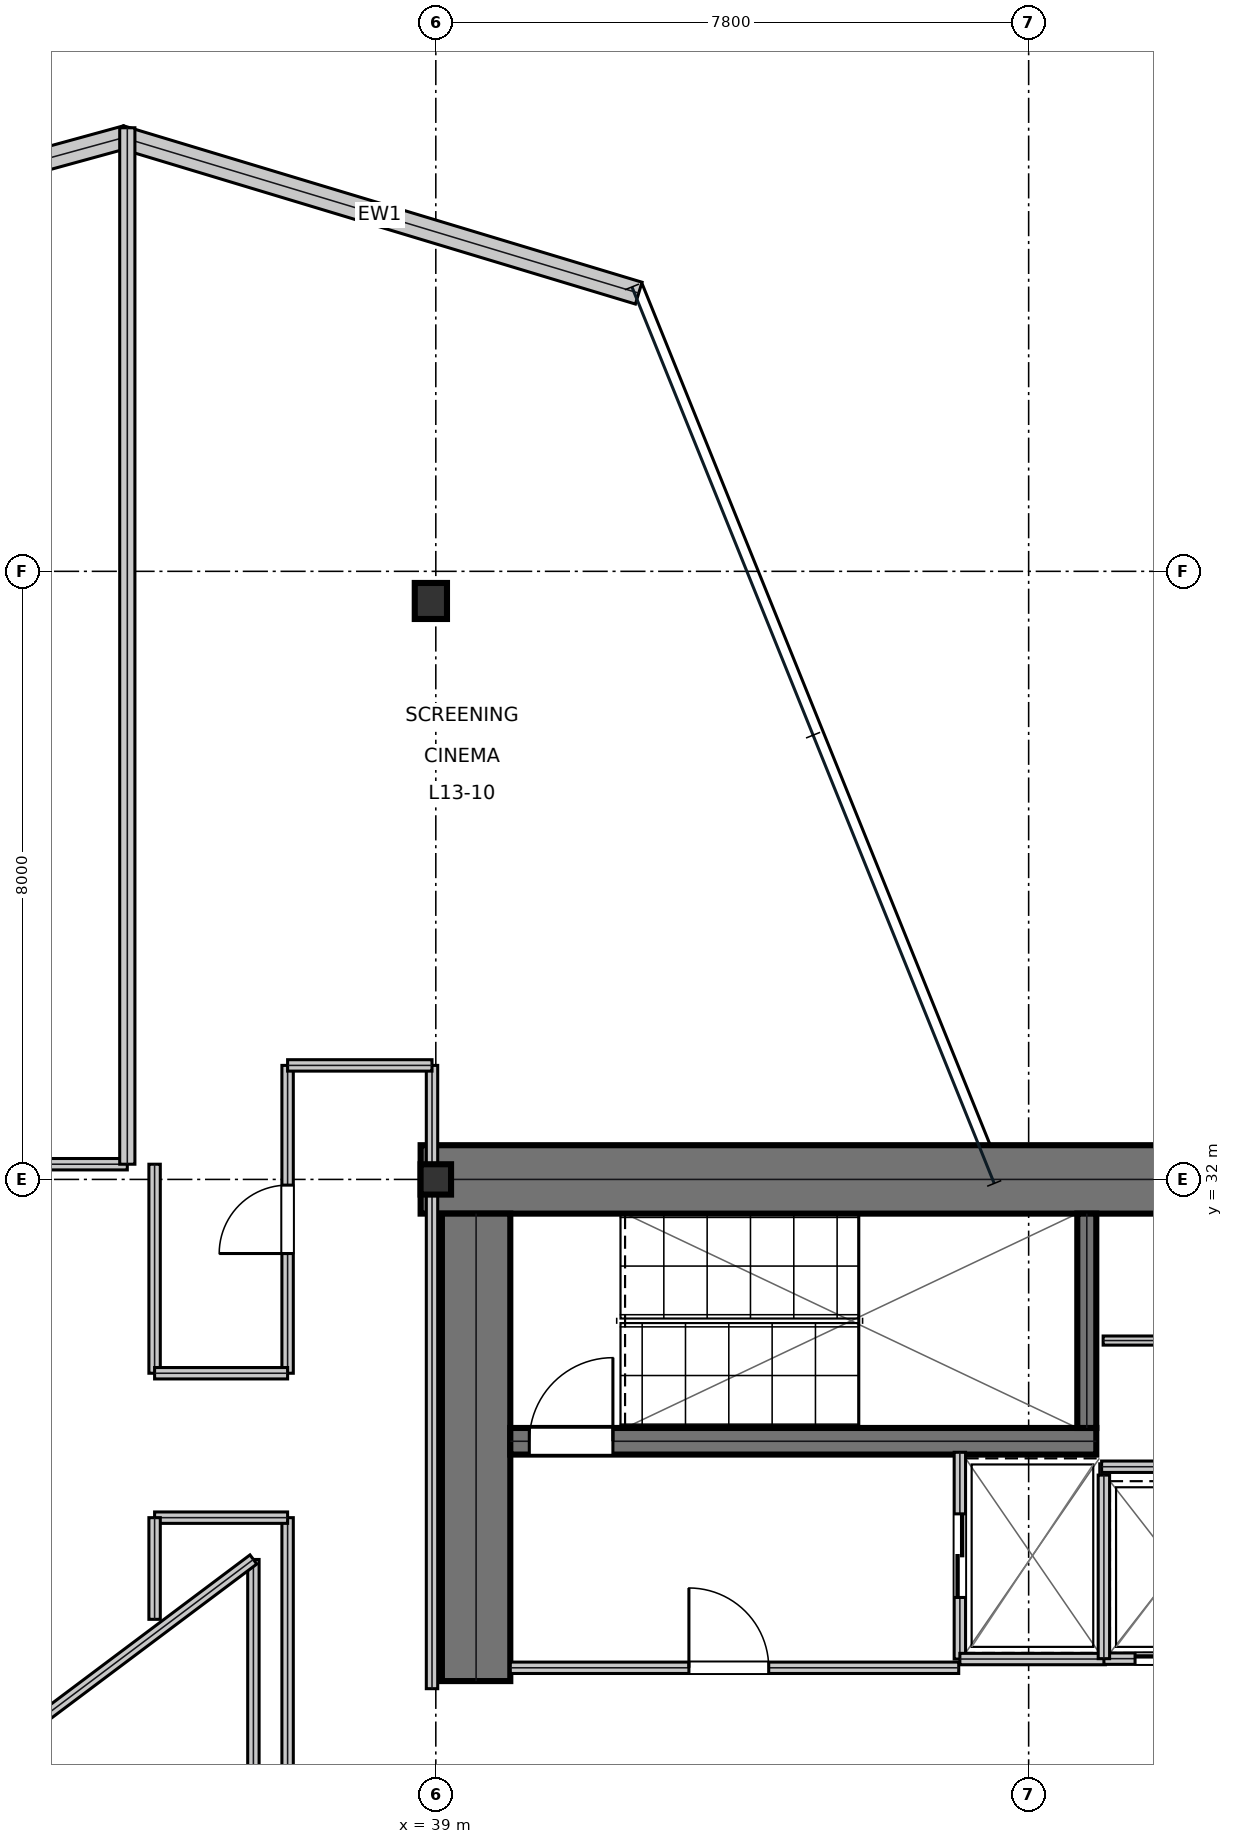
"""IFC4 building model, lengths in metres.
Left out: names, types, materials, properties, quantities, classifications, styles, units other than length and angle.
Written with IfcOpenShell. Run it as: python <this file> out.ifc"""

import sys

from ifc_helpers import new_model, si_unit, direction, frame, frame_2d, origin, origin_2d, place, context, subcontext, project, spatial, rectangle, i_section, extrude, element, fill, save


model = new_model("IFC4")
c1 = context("Model", 3, precision=1e-05, world=origin(), true_north=direction((0.0, 1.0)))
c2 = subcontext(c1, "Body", "Model", "MODEL_VIEW")
j1 = project(units=[si_unit("LENGTHUNIT", "METRE"), si_unit("PLANEANGLEUNIT", "RADIAN")], contexts=[c1])
p1 = place(None, origin())
s1 = spatial("IfcSite", under=j1, at=p1, CompositionType="ELEMENT")
p2 = place(p1, origin())
s2 = spatial("IfcBuilding", under=s1, at=p2, CompositionType="ELEMENT")
p3 = place(p2, frame((0.0, 0.0, 62.1)))
s3 = spatial("IfcBuildingStorey", under=s2, at=p3, CompositionType="ELEMENT", Elevation=62.1)
p4 = place(p3, frame((38.8, 32.0, 0.0), z_axis=(0.0, 0.0, 1.0), x_axis=(1.0, 0.0, 0.0)))
e1 = element("IfcWall", 1, at=p4, inside=s3, PredefinedType="SHEAR", context=c2, shape_type="SweptSolid", body=[
    extrude(rectangle(XDim=16.0, YDim=0.9, at=frame_2d((8.0, 0.0))), origin(), (0.0, 0.0, 1.0), 3.81),
])
p5 = place(p3, frame((39.53, 25.4, 0.0), z_axis=(0.0, 0.0, 1.0), x_axis=(0.0, 1.0, 0.0)))
e2 = element("IfcWall", 2, at=p5, inside=s3, PredefinedType="SHEAR", context=c2, shape_type="SweptSolid", body=[
    extrude(rectangle(XDim=6.15, YDim=0.9, at=frame_2d((3.075, 0.0))), origin(), (0.0, 0.0, 1.0), 3.81),
])
p6 = place(p3, frame((39.98, 28.555, 0.0), z_axis=(0.0, 0.0, 1.0), x_axis=(1.0, 0.0, 0.0)))
e3 = element("IfcWall", 3, at=p6, inside=s3, PredefinedType="SHEAR", context=c2, shape_type="SweptSolid", body=[
    extrude(rectangle(XDim=7.71, YDim=0.35, at=frame_2d((3.855, 0.0))), origin(), (0.0, 0.0, 1.0), 3.81),
])
p7 = place(p6, frame((0.25, 0.0, 0.0)))
e4 = element("IfcOpeningElement", 4, at=p7, cuts=e3, PredefinedType="OPENING", context=c2, shape_type="SweptSolid", body=[
    extrude(rectangle(XDim=1.1, YDim=2.15, at=frame_2d((0.55, 1.075))), frame((0.0, 0.185, 0.0), z_axis=(0.0, -1.0, 0.0), x_axis=(1.0, 0.0, 0.0)), (0.0, 0.0, 1.0), 0.37),
])
p8 = place(p3, frame((47.565, 28.73, 0.0), z_axis=(0.0, 0.0, 1.0), x_axis=(0.0, 1.0, 0.0)))
e5 = element("IfcWall", 5, at=p8, inside=s3, PredefinedType="SHEAR", context=c2, shape_type="SweptSolid", body=[
    extrude(rectangle(XDim=2.82, YDim=0.25, at=frame_2d((1.41, 0.0))), origin(), (0.0, 0.0, 1.0), 3.81),
])
p9 = place(p3, frame((39.0, 32.0, 0.0), z_axis=(0.0, 0.0, 1.0), x_axis=(1.0, 0.0, 0.0)))
e6 = element("IfcColumn", 6, at=p9, inside=s3, PredefinedType="COLUMN", context=c2, shape_type="SweptSolid", body=[
    extrude(i_section(OverallWidth=0.401, OverallDepth=0.399, WebThickness=0.025, FlangeThickness=0.04, at=origin_2d()), origin(), (0.0, 0.0, 1.0), 4.044),
])
p10 = place(p3, frame((38.935, 39.61, 0.016), z_axis=(0.0, 0.0, 1.0), x_axis=(1.0, 0.0, 0.0)))
e7 = element("IfcColumn", 7, at=p10, inside=s3, PredefinedType="COLUMN", context=c2, shape_type="SweptSolid", body=[
    extrude(i_section(OverallWidth=0.424, OverallDepth=0.474, WebThickness=0.048, FlangeThickness=0.077, at=origin_2d()), origin(), (0.0, 0.0, 1.0), 4.018),
])
p11 = place(p3, frame((41.67, 43.66, 0.0), z_axis=(0.0, 0.0, 1.0), x_axis=(-0.957387451844, 0.288806625707, 0.0)))
e8 = element("IfcWall", 8, at=p11, inside=s3, PredefinedType="STANDARD", context=c2, shape_type="SweptSolid", body=[
    extrude(rectangle(XDim=7.123, YDim=0.3, at=frame_2d((3.562, 0.0))), origin(), (0.0, 0.0, 1.0), 3.81),
])
p12 = place(p3, frame((34.928, 45.716, 0.0), z_axis=(0.0, 0.0, 1.0), x_axis=(-0.96439075506, -0.264481514581, 0.0)))
e9 = element("IfcWall", 9, at=p12, inside=s3, PredefinedType="STANDARD", context=c2, shape_type="SweptSolid", body=[
    extrude(rectangle(XDim=7.071, YDim=0.3, at=frame_2d((3.535, 0.0))), origin(), (0.0, 0.0, 1.0), 3.81),
])
p13 = place(p3, frame((39.98, 25.575, 0.0), z_axis=(0.0, 0.0, 1.0), x_axis=(1.0, 0.0, 0.0)))
e10 = element("IfcWall", 10, at=p13, inside=s3, PredefinedType="PARTITIONING", context=c2, shape_type="SweptSolid", body=[
    extrude(rectangle(XDim=5.9, YDim=0.15, at=frame_2d((2.95, 0.0))), origin(), (0.0, 0.0, 1.0), 3.81),
])
p14 = place(p13, frame((2.35, 0.0, 0.0)))
e11 = element("IfcOpeningElement", 11, at=p14, cuts=e10, PredefinedType="OPENING", context=c2, shape_type="SweptSolid", body=[
    extrude(rectangle(XDim=1.05, YDim=2.15, at=frame_2d((0.525, 1.075))), frame((0.0, 0.085, 0.0), z_axis=(0.0, -1.0, 0.0), x_axis=(1.0, 0.0, 0.0)), (0.0, 0.0, 1.0), 0.17),
])
p15 = place(p3, frame((45.895, 25.69, 0.0), z_axis=(0.0, 0.0, 1.0), x_axis=(0.0, 1.0, 0.0)))
e12 = element("IfcWall", 12, at=p15, inside=s3, PredefinedType="PARTITIONING", context=c2, shape_type="SweptSolid", body=[
    extrude(rectangle(XDim=2.72, YDim=0.15, at=frame_2d((1.36, 0.0))), origin(), (0.0, 0.0, 1.0), 3.81),
])
p16 = place(p15, frame((0.81, 0.0, 0.0)))
e13 = element("IfcOpeningElement", 13, at=p16, cuts=e12, PredefinedType="OPENING", context=c2, shape_type="SweptSolid", body=[
    extrude(rectangle(XDim=1.1, YDim=2.15, at=frame_2d((0.55, 1.075))), frame((0.0, 0.085, 0.0), z_axis=(0.0, -1.0, 0.0), x_axis=(1.0, 0.0, 0.0)), (0.0, 0.0, 1.0), 0.17),
])
p17 = place(p3, frame((45.895, 25.69, 0.0), z_axis=(0.0, 0.0, 1.0), x_axis=(1.0, 0.0, 0.0)))
e14 = element("IfcWall", 14, at=p17, inside=s3, PredefinedType="PARTITIONING", context=c2, shape_type="SweptSolid", body=[
    extrude(rectangle(XDim=1.915, YDim=0.15, at=frame_2d((0.958, 0.0))), origin(), (0.0, 0.0, 1.0), 3.81),
])
p18 = place(p3, frame((47.79, 25.695, 0.0), z_axis=(0.0, 0.0, 1.0), x_axis=(1.0, 0.0, 0.0)))
e15 = element("IfcWall", 15, at=p18, inside=s3, PredefinedType="PARTITIONING", context=c2, shape_type="SweptSolid", body=[
    extrude(rectangle(XDim=1.92, YDim=0.15, at=frame_2d((0.96, 0.0))), origin(), (0.0, 0.0, 1.0), 3.81),
])
p19 = place(p18, frame((0.41, 0.0, 0.0)))
e16 = element("IfcOpeningElement", 16, at=p19, cuts=e15, PredefinedType="OPENING", context=c2, shape_type="SweptSolid", body=[
    extrude(rectangle(XDim=1.1, YDim=2.15, at=frame_2d((0.55, 1.075))), frame((0.0, 0.085, 0.0), z_axis=(0.0, -1.0, 0.0), x_axis=(1.0, 0.0, 0.0)), (0.0, 0.0, 1.0), 0.17),
])
p20 = place(p3, frame((47.79, 25.695, 0.0), z_axis=(0.0, 0.0, 1.0), x_axis=(0.0, 1.0, 0.0)))
e17 = element("IfcWall", 17, at=p20, inside=s3, PredefinedType="PARTITIONING", context=c2, shape_type="SweptSolid", body=[
    extrude(rectangle(XDim=2.415, YDim=0.15, at=frame_2d((1.208, 0.0))), origin(), (0.0, 0.0, 1.0), 3.81),
])
p21 = place(p3, frame((47.76, 28.22, 0.0), z_axis=(0.0, 0.0, 1.0), x_axis=(1.0, 0.0, 0.0)))
e18 = element("IfcWall", 18, at=p21, inside=s3, PredefinedType="PARTITIONING", context=c2, shape_type="SweptSolid", body=[
    extrude(rectangle(XDim=1.96, YDim=0.15, at=frame_2d((0.98, 0.0))), origin(), (0.0, 0.0, 1.0), 3.81),
])
p22 = place(p3, frame((47.78, 29.88, 0.0), z_axis=(0.0, 0.0, 1.0), x_axis=(1.0, 0.0, 0.0)))
e19 = element("IfcWall", 19, at=p22, inside=s3, PredefinedType="PARTITIONING", context=c2, shape_type="SweptSolid", body=[
    extrude(rectangle(XDim=1.92, YDim=0.12, at=frame_2d((0.96, 0.0))), origin(), (0.0, 0.0, 1.0), 3.81),
])
p23 = place(p3, frame((37.05, 14.5, 0.0), z_axis=(0.0, 0.0, 1.0), x_axis=(0.0, 1.0, 0.0)))
e20 = element("IfcWall", 20, at=p23, inside=s3, PredefinedType="PARTITIONING", context=c2, shape_type="SweptSolid", body=[
    extrude(rectangle(XDim=13.05, YDim=0.15, at=frame_2d((6.525, 0.0))), origin(), (0.0, 0.0, 1.0), 3.181),
])
p24 = place(p23, frame((4.635, 0.0, 0.0)))
e21 = element("IfcOpeningElement", 21, at=p24, cuts=e20, PredefinedType="OPENING", context=c2, shape_type="SweptSolid", body=[
    extrude(rectangle(XDim=0.9, YDim=2.15, at=frame_2d((0.45, 1.075))), frame((0.0, 0.085, 0.0), z_axis=(0.0, -1.0, 0.0), x_axis=(1.0, 0.0, 0.0)), (0.0, 0.0, 1.0), 0.17),
])
p25 = place(p3, frame((37.05, 29.45, 0.0), z_axis=(0.0, 0.0, 1.0), x_axis=(0.0, 1.0, 0.0)))
e22 = element("IfcWall", 22, at=p25, inside=s3, PredefinedType="PARTITIONING", context=c2, shape_type="SweptSolid", body=[
    extrude(rectangle(XDim=4.05, YDim=0.15, at=frame_2d((2.025, 0.0))), origin(), (0.0, 0.0, 1.0), 3.181),
])
p26 = place(p25, frame((1.575, 0.0, 0.0)))
e23 = element("IfcOpeningElement", 23, at=p26, cuts=e22, PredefinedType="OPENING", context=c2, shape_type="SweptSolid", body=[
    extrude(rectangle(XDim=0.9, YDim=2.15, at=frame_2d((0.45, 1.075))), frame((0.0, 0.085, 0.0), z_axis=(0.0, -1.0, 0.0), x_axis=(1.0, 0.0, 0.0)), (0.0, 0.0, 1.0), 0.17),
])
p27 = place(p3, frame((35.3, 27.55, 0.0), z_axis=(0.0, 0.0, 1.0), x_axis=(1.0, 0.0, 0.0)))
e24 = element("IfcWall", 24, at=p27, inside=s3, PredefinedType="PARTITIONING", context=c2, shape_type="SweptSolid", body=[
    extrude(rectangle(XDim=1.75, YDim=0.15, at=frame_2d((0.875, 0.0))), origin(), (0.0, 0.0, 1.0), 3.391),
])
p28 = place(p3, frame((35.3, 26.212, 0.0), z_axis=(0.0, 0.0, 1.0), x_axis=(0.0, 1.0, 0.0)))
e25 = element("IfcWall", 25, at=p28, inside=s3, PredefinedType="PARTITIONING", context=c2, shape_type="SweptSolid", body=[
    extrude(rectangle(XDim=1.338, YDim=0.15, at=frame_2d((0.669, 0.0))), origin(), (0.0, 0.0, 1.0), 3.81),
])
p29 = place(p3, frame((33.4, 32.2, 0.0), z_axis=(0.0, 0.0, 1.0), x_axis=(1.0, 0.0, 0.0)))
e26 = element("IfcWall", 26, at=p29, inside=s3, PredefinedType="PARTITIONING", context=c2, shape_type="SweptSolid", body=[
    extrude(rectangle(XDim=1.541, YDim=0.15, at=frame_2d((0.771, 0.0))), origin(), (0.0, 0.0, 1.0), 3.181),
])
p30 = place(p3, frame((38.95, 25.3, 0.0), z_axis=(0.0, 0.0, 1.0), x_axis=(0.0, 1.0, 0.0)))
e27 = element("IfcWall", 27, at=p30, inside=s3, PredefinedType="PARTITIONING", context=c2, shape_type="SweptSolid", body=[
    extrude(rectangle(XDim=8.2, YDim=0.15, at=frame_2d((4.1, 0.0))), origin(), (0.0, 0.0, 1.0), 3.181),
])
p31 = place(p3, frame((35.3, 29.45, 0.0), z_axis=(0.0, 0.0, 1.0), x_axis=(0.0, 1.0, 0.0)))
e28 = element("IfcWall", 28, at=p31, inside=s3, PredefinedType="PARTITIONING", context=c2, shape_type="SweptSolid", body=[
    extrude(rectangle(XDim=2.75, YDim=0.15, at=frame_2d((1.375, 0.0))), origin(), (0.0, 0.0, 1.0), 3.181),
])
p32 = place(p3, frame((37.05, 33.5, 0.0), z_axis=(0.0, 0.0, 1.0), x_axis=(1.0, 0.0, 0.0)))
e29 = element("IfcWall", 29, at=p32, inside=s3, PredefinedType="PARTITIONING", context=c2, shape_type="SweptSolid", body=[
    extrude(rectangle(XDim=1.9, YDim=0.15, at=frame_2d((0.95, 0.0))), origin(), (0.0, 0.0, 1.0), 3.81),
])
p33 = place(p3, frame((35.3, 29.45, 0.0), z_axis=(0.0, 0.0, 1.0), x_axis=(1.0, 0.0, 0.0)))
e30 = element("IfcWall", 30, at=p33, inside=s3, PredefinedType="PARTITIONING", context=c2, shape_type="SweptSolid", body=[
    extrude(rectangle(XDim=1.75, YDim=0.15, at=frame_2d((0.875, 0.0))), origin(), (0.0, 0.0, 1.0), 3.81),
])
p34 = place(p3, frame((34.941, 32.2, 0.0), z_axis=(0.0, 0.0, 1.0), x_axis=(0.0, 1.0, 0.0)))
e31 = element("IfcWall", 31, at=p34, inside=s3, PredefinedType="SOLIDWALL", context=c2, shape_type="SweptSolid", body=[
    extrude(rectangle(XDim=13.636, YDim=0.2, at=frame_2d((6.818, 0.0))), origin(), (0.0, 0.0, 1.0), 3.338),
])
p35 = place(p3, frame((36.6, 21.0, 0.0), z_axis=(0.0, 0.0, 1.0), x_axis=(0.0, 1.0, 0.0)))
e32 = element("IfcWall", 32, at=p35, inside=s3, PredefinedType="MOVABLE", context=c2, shape_type="SweptSolid", body=[
    extrude(rectangle(XDim=6.0, YDim=0.15, at=frame_2d((3.0, 0.0))), origin(), (0.0, 0.0, 1.0), 3.81),
])
p36 = place(p3, frame((36.6, 27.0, 0.0), z_axis=(0.0, 0.0, 1.0), x_axis=(-0.8, -0.6, 0.0)))
e33 = element("IfcWall", 33, at=p36, inside=s3, PredefinedType="MOVABLE", context=c2, shape_type="SweptSolid", body=[
    extrude(rectangle(XDim=5.0, YDim=0.15, at=frame_2d((2.5, 0.0))), origin(), (0.0, 0.0, 1.0), 3.81),
])
p37 = place(p14, origin())
e34 = element("IfcDoor", 34, at=p37, inside=s3, OperationType="SINGLE_SWING_LEFT", PredefinedType="DOOR", context=c2, shape_type="SweptSolid", body=[
    extrude(rectangle(XDim=1.05, YDim=2.15, at=frame_2d((0.525, 1.075))), frame((0.0, 0.025, 0.0), z_axis=(0.0, -1.0, 0.0), x_axis=(1.0, 0.0, 0.0)), (0.0, 0.0, 1.0), 0.05),
])
fill(e11, e34)
p38 = place(p16, frame((1.1, 0.0, 0.0), z_axis=(0.0, 0.0, 1.0), x_axis=(-1.0, 0.0, 0.0)))
e35 = element("IfcDoor", 35, at=p38, inside=s3, OperationType="DOUBLE_DOOR_SLIDING", PredefinedType="DOOR", context=c2, shape_type="SweptSolid", body=[
    extrude(rectangle(XDim=1.1, YDim=2.15, at=frame_2d((0.55, 1.075))), frame((0.0, 0.025, 0.0), z_axis=(0.0, -1.0, 0.0), x_axis=(1.0, 0.0, 0.0)), (0.0, 0.0, 1.0), 0.05),
])
fill(e13, e35)
p39 = place(p19, frame((1.1, 0.0, 0.0), z_axis=(0.0, 0.0, 1.0), x_axis=(-1.0, 0.0, 0.0)))
e36 = element("IfcDoor", 36, at=p39, inside=s3, OperationType="DOUBLE_DOOR_SLIDING", PredefinedType="DOOR", context=c2, shape_type="SweptSolid", body=[
    extrude(rectangle(XDim=1.1, YDim=2.15, at=frame_2d((0.55, 1.075))), frame((0.0, 0.025, 0.0), z_axis=(0.0, -1.0, 0.0), x_axis=(1.0, 0.0, 0.0)), (0.0, 0.0, 1.0), 0.05),
])
fill(e16, e36)
p40 = place(p26, origin())
e37 = element("IfcDoor", 37, at=p40, inside=s3, OperationType="SINGLE_SWING_LEFT", PredefinedType="DOOR", context=c2, shape_type="SweptSolid", body=[
    extrude(rectangle(XDim=0.9, YDim=2.15, at=frame_2d((0.45, 1.075))), frame((0.0, 0.025, 0.0), z_axis=(0.0, -1.0, 0.0), x_axis=(1.0, 0.0, 0.0)), (0.0, 0.0, 1.0), 0.05),
])
fill(e23, e37)
p41 = place(p7, origin())
e38 = element("IfcDoor", 38, at=p41, inside=s3, OperationType="SINGLE_SWING_RIGHT", PredefinedType="DOOR", context=c2, shape_type="SweptSolid", body=[
    extrude(rectangle(XDim=1.1, YDim=2.15, at=frame_2d((0.55, 1.075))), frame((0.0, 0.025, 0.0), z_axis=(0.0, -1.0, 0.0), x_axis=(1.0, 0.0, 0.0)), (0.0, 0.0, 1.0), 0.05),
])
fill(e4, e38)
save(model, sys.argv[1])
